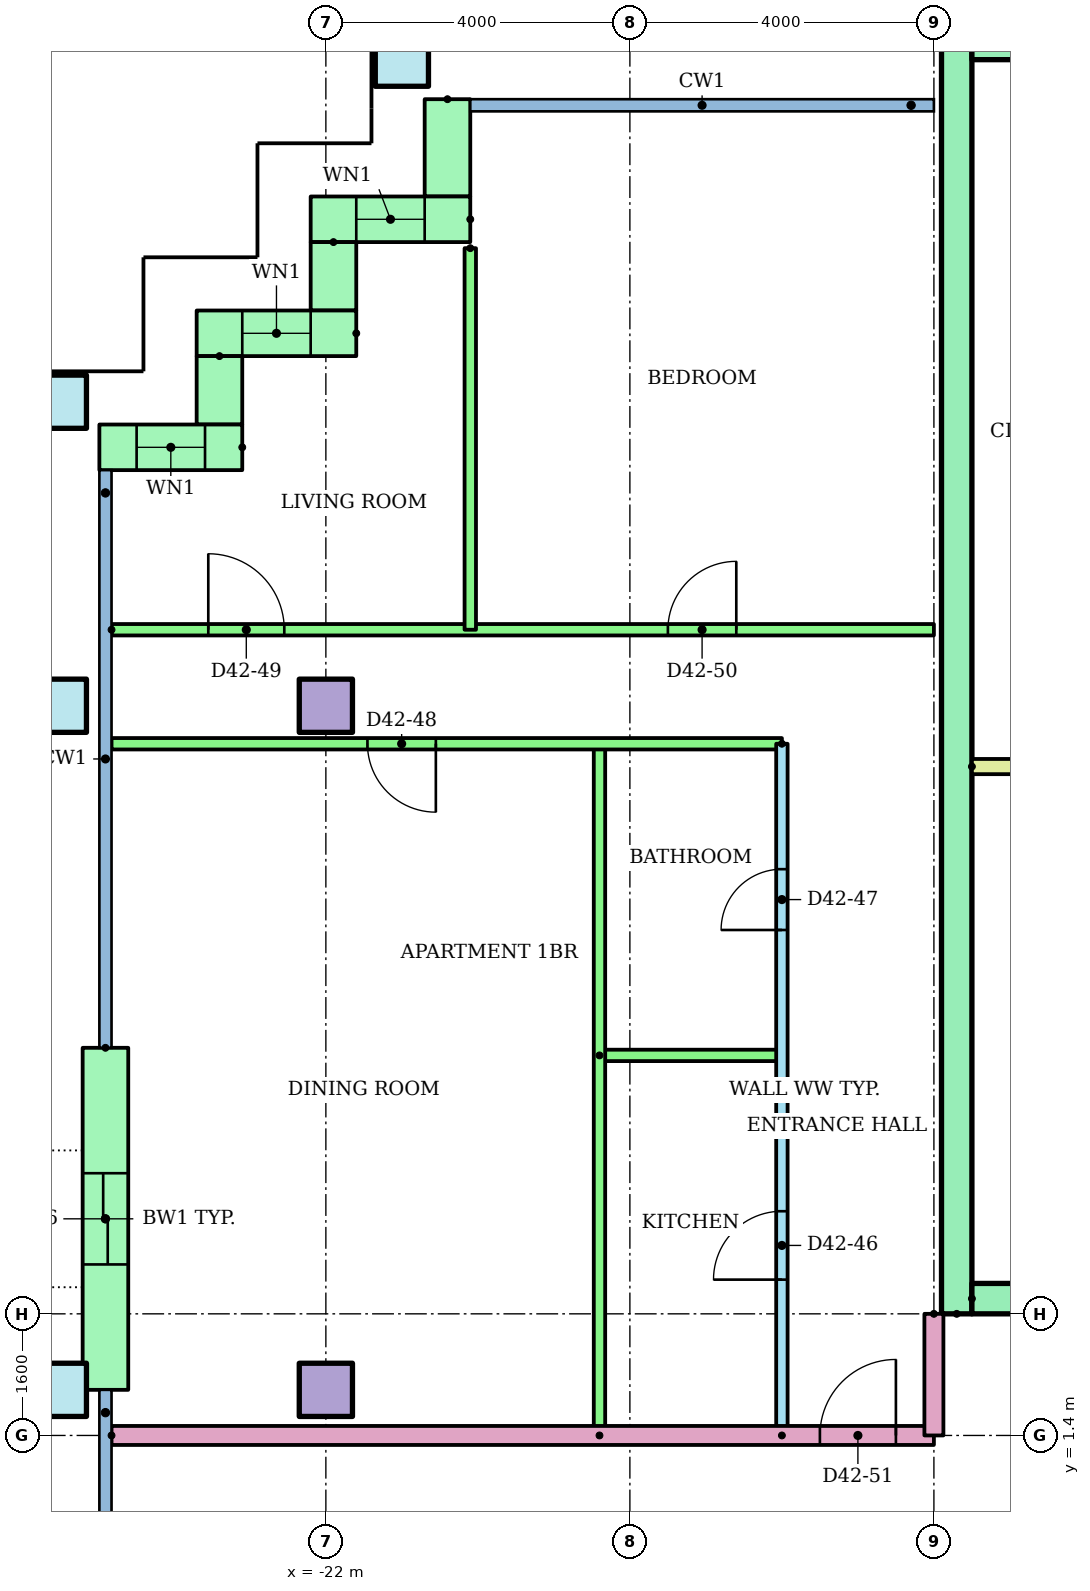
"""IFC4 building model, lengths in metres.
Left out: names, types, materials, properties, quantities, classifications, styles, units other than length and angle.
Written with IfcOpenShell. Run it as: python <this file> out.ifc"""

import sys

from ifc_helpers import new_model, si_unit, direction, frame, frame_2d, origin, origin_2d, place, context, subcontext, project, spatial, rectangle, hollow_rectangle, extrude, element, fill, save


model = new_model("IFC4")
c1 = context("Model", 3, precision=1e-05, world=origin(), true_north=direction((0.0, 1.0)))
c2 = subcontext(c1, "Body", "Model", "MODEL_VIEW")
j1 = project(units=[si_unit("LENGTHUNIT", "METRE"), si_unit("PLANEANGLEUNIT", "RADIAN")], contexts=[c1])
p1 = place(None, origin())
s1 = spatial("IfcSite", under=j1, at=p1, CompositionType="ELEMENT")
p2 = place(p1, origin())
s2 = spatial("IfcBuilding", under=s1, at=p2, CompositionType="ELEMENT")
p3 = place(p2, frame((0.0, 0.0, 165.3)))
s3 = spatial("IfcBuildingStorey", under=s2, at=p3, CompositionType="ELEMENT", Elevation=165.3)
p4 = place(p3, frame((-25.5, 2.0, 0.0)))
e1 = element("IfcColumn", 1, at=p4, inside=s3, PredefinedType="COLUMN", context=c2, shape_type="SweptSolid", body=[
    extrude(hollow_rectangle(XDim=0.7, YDim=0.7, WallThickness=0.036, at=origin_2d()), origin(), (0.0, 0.0, 1.0), 3.2),
])
p5 = place(p3, frame((-22.0, 2.0, 0.0)))
e2 = element("IfcColumn", 2, at=p5, inside=s3, PredefinedType="COLUMN", context=c2, shape_type="SweptSolid", body=[
    extrude(rectangle(XDim=0.7, YDim=0.7, at=origin_2d()), origin(), (0.0, 0.0, 1.0), 3.2),
])
p6 = place(p3, frame((-25.5, 11.0, 0.0)))
e3 = element("IfcColumn", 3, at=p6, inside=s3, PredefinedType="COLUMN", context=c2, shape_type="SweptSolid", body=[
    extrude(hollow_rectangle(XDim=0.7, YDim=0.7, WallThickness=0.036, at=origin_2d()), origin(), (0.0, 0.0, 1.0), 3.2),
])
p7 = place(p3, frame((-22.0, 11.0, 0.0)))
e4 = element("IfcColumn", 4, at=p7, inside=s3, PredefinedType="COLUMN", context=c2, shape_type="SweptSolid", body=[
    extrude(rectangle(XDim=0.7, YDim=0.7, at=origin_2d()), origin(), (0.0, 0.0, 1.0), 3.2),
])
for number, where in (
    (5, (-25.5, 15.0, 0.0)),
    (6, (-21.0, 19.5, 0.0)),
):
    element("IfcColumn", number, at=place(p3, frame(where)), inside=s3, PredefinedType="COLUMN", context=c2, shape_type="SweptSolid", body=[
        extrude(hollow_rectangle(XDim=0.7, YDim=0.7, WallThickness=0.036, at=origin_2d()), origin(), (0.0, 0.0, 1.0), 3.2),
    ])
p8 = place(p3, frame((-20.4, 18.98, 0.0), z_axis=(0.0, 0.0, 1.0), x_axis=(0.0, -1.0, 0.0)))
e7 = element("IfcWall", 7, at=p8, inside=s3, PredefinedType="STANDARD", context=c2, shape_type="SweptSolid", body=[
    extrude(rectangle(XDim=1.28, YDim=0.6, at=frame_2d((0.64, 0.0))), origin(), (0.0, 0.0, 1.0), 2.92),
])
p9 = place(p3, frame((-20.1, 17.4, 0.0), z_axis=(0.0, 0.0, 1.0), x_axis=(-1.0, 0.0, 0.0)))
e8 = element("IfcWall", 8, at=p9, inside=s3, PredefinedType="STANDARD", context=c2, shape_type="SweptSolid", body=[
    extrude(rectangle(XDim=2.1, YDim=0.6, at=frame_2d((1.05, 0.0))), origin(), (0.0, 0.0, 1.0), 2.92),
])
p10 = place(p9, frame((0.6, 0.0, 0.9)))
e9 = element("IfcOpeningElement", 9, at=p10, cuts=e8, PredefinedType="OPENING", context=c2, shape_type="SweptSolid", body=[
    extrude(rectangle(XDim=0.9, YDim=1.5, at=frame_2d((0.45, 0.75))), frame((0.0, 0.31, 0.0), z_axis=(0.0, -1.0, 0.0), x_axis=(1.0, 0.0, 0.0)), (0.0, 0.0, 1.0), 0.62),
])
p11 = place(p3, frame((-21.9, 17.1, 0.0), z_axis=(0.0, 0.0, 1.0), x_axis=(0.0, -1.0, 0.0)))
e10 = element("IfcWall", 10, at=p11, inside=s3, PredefinedType="STANDARD", context=c2, shape_type="SweptSolid", body=[
    extrude(rectangle(XDim=0.9, YDim=0.6, at=frame_2d((0.45, 0.0))), origin(), (0.0, 0.0, 1.0), 2.92),
])
p12 = place(p3, frame((-21.6, 15.9, 0.0), z_axis=(0.0, 0.0, 1.0), x_axis=(-1.0, 0.0, 0.0)))
e11 = element("IfcWall", 11, at=p12, inside=s3, PredefinedType="STANDARD", context=c2, shape_type="SweptSolid", body=[
    extrude(rectangle(XDim=2.1, YDim=0.6, at=frame_2d((1.05, 0.0))), origin(), (0.0, 0.0, 1.0), 2.92),
])
p13 = place(p12, frame((0.6, 0.0, 0.9)))
e12 = element("IfcOpeningElement", 12, at=p13, cuts=e11, PredefinedType="OPENING", context=c2, shape_type="SweptSolid", body=[
    extrude(rectangle(XDim=0.9, YDim=1.5, at=frame_2d((0.45, 0.75))), frame((0.0, 0.31, 0.0), z_axis=(0.0, -1.0, 0.0), x_axis=(1.0, 0.0, 0.0)), (0.0, 0.0, 1.0), 0.62),
])
p14 = place(p3, frame((-23.4, 15.6, 0.0), z_axis=(0.0, 0.0, 1.0), x_axis=(0.0, -1.0, 0.0)))
e13 = element("IfcWall", 13, at=p14, inside=s3, PredefinedType="STANDARD", context=c2, shape_type="SweptSolid", body=[
    extrude(rectangle(XDim=0.9, YDim=0.6, at=frame_2d((0.45, 0.0))), origin(), (0.0, 0.0, 1.0), 2.92),
])
p15 = place(p3, frame((-23.1, 14.4, 0.0), z_axis=(0.0, 0.0, 1.0), x_axis=(-1.0, 0.0, 0.0)))
e14 = element("IfcWall", 14, at=p15, inside=s3, PredefinedType="STANDARD", context=c2, shape_type="SweptSolid", body=[
    extrude(rectangle(XDim=1.88, YDim=0.6, at=frame_2d((0.94, 0.0))), origin(), (0.0, 0.0, 1.0), 2.92),
])
p16 = place(p15, frame((0.49, 0.0, 0.9)))
e15 = element("IfcOpeningElement", 15, at=p16, cuts=e14, PredefinedType="OPENING", context=c2, shape_type="SweptSolid", body=[
    extrude(rectangle(XDim=0.9, YDim=1.5, at=frame_2d((0.45, 0.75))), frame((0.0, 0.31, 0.0), z_axis=(0.0, -1.0, 0.0), x_axis=(1.0, 0.0, 0.0)), (0.0, 0.0, 1.0), 0.62),
])
p17 = place(p3, frame((-24.9, 6.5, 0.0), z_axis=(0.0, 0.0, 1.0), x_axis=(0.0, -1.0, 0.0)))
e16 = element("IfcWall", 16, at=p17, inside=s3, PredefinedType="STANDARD", context=c2, shape_type="SweptSolid", body=[
    extrude(rectangle(XDim=4.5, YDim=0.6, at=frame_2d((2.25, 0.0))), origin(), (0.0, 0.0, 1.0), 2.92),
])
p18 = place(p17, frame((1.65, 0.0, 0.0)))
e17 = element("IfcOpeningElement", 17, at=p18, cuts=e16, PredefinedType="OPENING", context=c2, shape_type="SweptSolid", body=[
    extrude(rectangle(XDim=1.2, YDim=2.1, at=frame_2d((0.6, 1.05))), frame((0.0, 0.31, 0.0), z_axis=(0.0, -1.0, 0.0), x_axis=(1.0, 0.0, 0.0)), (0.0, 0.0, 1.0), 0.62),
])
p19 = place(p3, frame((-13.7, 3.0, 0.0), z_axis=(0.0, 0.0, 1.0), x_axis=(0.0, 1.0, 0.0)))
e18 = element("IfcWall", 18, at=p19, inside=s3, PredefinedType="SHEAR", context=c2, shape_type="SweptSolid", body=[
    extrude(rectangle(XDim=17.0, YDim=0.4, at=frame_2d((8.5, 0.0))), origin(), (0.0, 0.0, 1.0), 2.92),
])
p20 = place(p3, frame((-13.5, 19.7, 0.0)))
e19 = element("IfcWall", 19, at=p20, inside=s3, PredefinedType="SHEAR", context=c2, shape_type="SweptSolid", body=[
    extrude(rectangle(XDim=27.0, YDim=0.4, at=frame_2d((13.5, 0.0))), origin(), (0.0, 0.0, 1.0), 2.92),
])
p21 = place(p3, frame((-13.5, 3.2, 0.0)))
e20 = element("IfcWall", 20, at=p21, inside=s3, PredefinedType="SHEAR", context=c2, shape_type="SweptSolid", body=[
    extrude(rectangle(XDim=27.0, YDim=0.4, at=frame_2d((13.5, 0.0))), origin(), (0.0, 0.0, 1.0), 2.92),
])
p22 = place(p21, frame((22.083, 0.0, 0.0)))
e21 = element("IfcOpeningElement", 21, at=p22, cuts=e20, PredefinedType="OPENING", context=c2, shape_type="SweptSolid", body=[
    extrude(rectangle(XDim=1.1, YDim=2.1, at=frame_2d((0.55, 1.05))), frame((0.0, 0.21, 0.0), z_axis=(0.0, -1.0, 0.0), x_axis=(1.0, 0.0, 0.0)), (0.0, 0.0, 1.0), 0.42),
])
p23 = place(p21, frame((25.128, 0.0, 0.0)))
e22 = element("IfcOpeningElement", 22, at=p23, cuts=e20, PredefinedType="OPENING", context=c2, shape_type="SweptSolid", body=[
    extrude(rectangle(XDim=1.1, YDim=2.1, at=frame_2d((0.55, 1.05))), frame((0.0, 0.21, 0.0), z_axis=(0.0, -1.0, 0.0), x_axis=(1.0, 0.0, 0.0)), (0.0, 0.0, 1.0), 0.42),
])
p24 = place(p21, frame((12.6, 0.0, 0.0)))
e23 = element("IfcOpeningElement", 23, at=p24, cuts=e20, PredefinedType="OPENING", context=c2, shape_type="SweptSolid", body=[
    extrude(rectangle(XDim=1.8, YDim=2.1, at=frame_2d((0.9, 1.05))), frame((0.0, 0.21, 0.0), z_axis=(0.0, -1.0, 0.0), x_axis=(1.0, 0.0, 0.0)), (0.0, 0.0, 1.0), 0.42),
])
p25 = place(p3, frame((-13.5, 10.2, 0.0)))
e24 = element("IfcWall", 24, at=p25, inside=s3, PredefinedType="PARTITIONING", context=c2, shape_type="SweptSolid", body=[
    extrude(rectangle(XDim=3.9, YDim=0.2, at=frame_2d((1.95, 0.0))), origin(), (0.0, 0.0, 1.0), 2.92),
])
p26 = place(p3, frame((-16.0, 1.4, 0.0), z_axis=(0.0, 0.0, 1.0), x_axis=(0.0, 1.0, 0.0)))
e25 = element("IfcWall", 25, at=p26, inside=s3, PredefinedType="PARTITIONING", context=c2, shape_type="SweptSolid", body=[
    extrude(rectangle(XDim=9.1, YDim=0.15, at=frame_2d((4.55, 0.0))), origin(), (0.0, 0.0, 1.0), 2.4),
])
p27 = place(p26, frame((2.05, 0.0, 0.0)))
e26 = element("IfcOpeningElement", 26, at=p27, cuts=e25, PredefinedType="OPENING", context=c2, shape_type="SweptSolid", body=[
    extrude(rectangle(XDim=0.9, YDim=2.1, at=frame_2d((0.45, 1.05))), frame((0.0, 0.085, 0.0), z_axis=(0.0, -1.0, 0.0), x_axis=(1.0, 0.0, 0.0)), (0.0, 0.0, 1.0), 0.17),
])
p28 = place(p26, frame((6.65, 0.0, 0.0)))
e27 = element("IfcOpeningElement", 27, at=p28, cuts=e25, PredefinedType="OPENING", context=c2, shape_type="SweptSolid", body=[
    extrude(rectangle(XDim=0.8, YDim=2.1, at=frame_2d((0.4, 1.05))), frame((0.0, 0.085, 0.0), z_axis=(0.0, -1.0, 0.0), x_axis=(1.0, 0.0, 0.0)), (0.0, 0.0, 1.0), 0.17),
])
p29 = place(p3, frame((-18.4, 6.4, 0.0)))
e28 = element("IfcWall", 28, at=p29, inside=s3, PredefinedType="PARTITIONING", context=c2, shape_type="SweptSolid", body=[
    extrude(rectangle(XDim=2.4, YDim=0.15, at=frame_2d((1.2, 0.0))), origin(), (0.0, 0.0, 1.0), 2.4),
])
p30 = place(p3, frame((-18.4, 1.4, 0.0), z_axis=(0.0, 0.0, 1.0), x_axis=(0.0, 1.0, 0.0)))
e29 = element("IfcWall", 29, at=p30, inside=s3, PredefinedType="PARTITIONING", context=c2, shape_type="SweptSolid", body=[
    extrude(rectangle(XDim=9.1, YDim=0.15, at=frame_2d((4.55, 0.0))), origin(), (0.0, 0.0, 1.0), 2.4),
])
p31 = place(p3, frame((-16.0, 10.5, 0.0), z_axis=(0.0, 0.0, 1.0), x_axis=(-1.0, 0.0, 0.0)))
e30 = element("IfcWall", 30, at=p31, inside=s3, PredefinedType="PARTITIONING", context=c2, shape_type="SweptSolid", body=[
    extrude(rectangle(XDim=8.82, YDim=0.15, at=frame_2d((4.41, 0.0))), origin(), (0.0, 0.0, 1.0), 2.4),
])
p32 = place(p31, frame((4.553, 0.0, 0.0)))
e31 = element("IfcOpeningElement", 31, at=p32, cuts=e30, PredefinedType="OPENING", context=c2, shape_type="SweptSolid", body=[
    extrude(rectangle(XDim=0.9, YDim=2.1, at=frame_2d((0.45, 1.05))), frame((0.0, 0.085, 0.0), z_axis=(0.0, -1.0, 0.0), x_axis=(1.0, 0.0, 0.0)), (0.0, 0.0, 1.0), 0.17),
])
p33 = place(p3, frame((-24.82, 12.0, 0.0)))
e32 = element("IfcWall", 32, at=p33, inside=s3, PredefinedType="PARTITIONING", context=c2, shape_type="SweptSolid", body=[
    extrude(rectangle(XDim=10.82, YDim=0.15, at=frame_2d((5.41, 0.0))), origin(), (0.0, 0.0, 1.0), 2.4),
])
p34 = place(p33, frame((1.273, 0.0, 0.0)))
e33 = element("IfcOpeningElement", 33, at=p34, cuts=e32, PredefinedType="OPENING", context=c2, shape_type="SweptSolid", body=[
    extrude(rectangle(XDim=1.0, YDim=2.1, at=frame_2d((0.5, 1.05))), frame((0.0, 0.085, 0.0), z_axis=(0.0, -1.0, 0.0), x_axis=(1.0, 0.0, 0.0)), (0.0, 0.0, 1.0), 0.17),
])
p35 = place(p33, frame((7.32, 0.0, 0.0)))
e34 = element("IfcOpeningElement", 34, at=p35, cuts=e32, PredefinedType="OPENING", context=c2, shape_type="SweptSolid", body=[
    extrude(rectangle(XDim=0.9, YDim=2.1, at=frame_2d((0.45, 1.05))), frame((0.0, 0.085, 0.0), z_axis=(0.0, -1.0, 0.0), x_axis=(1.0, 0.0, 0.0)), (0.0, 0.0, 1.0), 0.17),
])
p36 = place(p3, frame((-20.1, 17.02, 0.0), z_axis=(0.0, 0.0, 1.0), x_axis=(0.0, -1.0, 0.0)))
e35 = element("IfcWall", 35, at=p36, inside=s3, PredefinedType="PARTITIONING", context=c2, shape_type="SweptSolid", body=[
    extrude(rectangle(XDim=5.02, YDim=0.15, at=frame_2d((2.51, 0.0))), origin(), (0.0, 0.0, 1.0), 2.4),
])
p37 = place(p3, frame((-24.82, 1.4, 0.0)))
e36 = element("IfcWall", 36, at=p37, inside=s3, PredefinedType="PARTITIONING", context=c2, shape_type="SweptSolid", body=[
    extrude(rectangle(XDim=10.82, YDim=0.25, at=frame_2d((5.41, 0.0))), origin(), (0.0, 0.0, 1.0), 2.4),
])
p38 = place(p37, frame((9.32, 0.0, 0.0)))
e37 = element("IfcOpeningElement", 37, at=p38, cuts=e36, PredefinedType="OPENING", context=c2, shape_type="SweptSolid", body=[
    extrude(rectangle(XDim=1.0, YDim=2.1, at=frame_2d((0.5, 1.05))), frame((0.0, 0.135, 0.0), z_axis=(0.0, -1.0, 0.0), x_axis=(1.0, 0.0, 0.0)), (0.0, 0.0, 1.0), 0.27),
])
p39 = place(p3, frame((-14.0, 3.0, 0.0), z_axis=(0.0, 0.0, 1.0), x_axis=(0.0, -1.0, 0.0)))
e38 = element("IfcWall", 38, at=p39, inside=s3, PredefinedType="PARTITIONING", context=c2, shape_type="SweptSolid", body=[
    extrude(rectangle(XDim=1.6, YDim=0.25, at=frame_2d((0.8, 0.0))), origin(), (0.0, 0.0, 1.0), 2.4),
])
p40 = place(p10, origin())
e39 = element("IfcWindow", 39, at=p40, inside=s3, PartitioningType="SINGLE_PANEL", PredefinedType="WINDOW", context=c2, shape_type="SweptSolid", body=[
    extrude(rectangle(XDim=0.9, YDim=1.5, at=frame_2d((0.45, 0.75))), frame((0.0, 0.03, 0.0), z_axis=(0.0, -1.0, 0.0), x_axis=(1.0, 0.0, 0.0)), (0.0, 0.0, 1.0), 0.06),
])
fill(e9, e39)
p41 = place(p13, origin())
e40 = element("IfcWindow", 40, at=p41, inside=s3, PartitioningType="SINGLE_PANEL", PredefinedType="WINDOW", context=c2, shape_type="SweptSolid", body=[
    extrude(rectangle(XDim=0.9, YDim=1.5, at=frame_2d((0.45, 0.75))), frame((0.0, 0.03, 0.0), z_axis=(0.0, -1.0, 0.0), x_axis=(1.0, 0.0, 0.0)), (0.0, 0.0, 1.0), 0.06),
])
fill(e12, e40)
p42 = place(p16, origin())
e41 = element("IfcWindow", 41, at=p42, inside=s3, PartitioningType="SINGLE_PANEL", PredefinedType="WINDOW", context=c2, shape_type="SweptSolid", body=[
    extrude(rectangle(XDim=0.9, YDim=1.5, at=frame_2d((0.45, 0.75))), frame((0.0, 0.03, 0.0), z_axis=(0.0, -1.0, 0.0), x_axis=(1.0, 0.0, 0.0)), (0.0, 0.0, 1.0), 0.06),
])
fill(e15, e41)
p43 = place(p27, origin())
e42 = element("IfcDoor", 42, at=p43, inside=s3, OperationType="SINGLE_SWING_LEFT", PredefinedType="DOOR", context=c2, shape_type="SweptSolid", body=[
    extrude(rectangle(XDim=0.9, YDim=2.1, at=frame_2d((0.45, 1.05))), frame((0.0, 0.025, 0.0), z_axis=(0.0, -1.0, 0.0), x_axis=(1.0, 0.0, 0.0)), (0.0, 0.0, 1.0), 0.05),
])
fill(e26, e42)
p44 = place(p28, origin())
e43 = element("IfcDoor", 43, at=p44, inside=s3, OperationType="SINGLE_SWING_LEFT", PredefinedType="DOOR", context=c2, shape_type="SweptSolid", body=[
    extrude(rectangle(XDim=0.8, YDim=2.1, at=frame_2d((0.4, 1.05))), frame((0.0, 0.025, 0.0), z_axis=(0.0, -1.0, 0.0), x_axis=(1.0, 0.0, 0.0)), (0.0, 0.0, 1.0), 0.05),
])
fill(e27, e43)
p45 = place(p32, origin())
e44 = element("IfcDoor", 44, at=p45, inside=s3, OperationType="SINGLE_SWING_LEFT", PredefinedType="DOOR", context=c2, shape_type="SweptSolid", body=[
    extrude(rectangle(XDim=0.9, YDim=2.1, at=frame_2d((0.45, 1.05))), frame((0.0, 0.025, 0.0), z_axis=(0.0, -1.0, 0.0), x_axis=(1.0, 0.0, 0.0)), (0.0, 0.0, 1.0), 0.05),
])
fill(e31, e44)
p46 = place(p34, origin())
e45 = element("IfcDoor", 45, at=p46, inside=s3, OperationType="SINGLE_SWING_LEFT", PredefinedType="DOOR", context=c2, shape_type="SweptSolid", body=[
    extrude(rectangle(XDim=1.0, YDim=2.1, at=frame_2d((0.5, 1.05))), frame((0.0, 0.025, 0.0), z_axis=(0.0, -1.0, 0.0), x_axis=(1.0, 0.0, 0.0)), (0.0, 0.0, 1.0), 0.05),
])
fill(e33, e45)
p47 = place(p35, origin())
e46 = element("IfcDoor", 46, at=p47, inside=s3, OperationType="SINGLE_SWING_RIGHT", PredefinedType="DOOR", context=c2, shape_type="SweptSolid", body=[
    extrude(rectangle(XDim=0.9, YDim=2.1, at=frame_2d((0.45, 1.05))), frame((0.0, 0.025, 0.0), z_axis=(0.0, -1.0, 0.0), x_axis=(1.0, 0.0, 0.0)), (0.0, 0.0, 1.0), 0.05),
])
fill(e34, e46)
p48 = place(p38, origin())
e47 = element("IfcDoor", 47, at=p48, inside=s3, OperationType="SINGLE_SWING_RIGHT", PredefinedType="DOOR", context=c2, shape_type="SweptSolid", body=[
    extrude(rectangle(XDim=1.0, YDim=2.1, at=frame_2d((0.5, 1.05))), frame((0.0, 0.025, 0.0), z_axis=(0.0, -1.0, 0.0), x_axis=(1.0, 0.0, 0.0)), (0.0, 0.0, 1.0), 0.05),
])
fill(e37, e47)
p49 = place(p18, origin())
e48 = element("IfcDoor", 48, at=p49, inside=s3, OperationType="SLIDING_TO_LEFT", PredefinedType="DOOR", context=c2, shape_type="SweptSolid", body=[
    extrude(rectangle(XDim=1.2, YDim=2.1, at=frame_2d((0.6, 1.05))), frame((0.0, 0.025, 0.0), z_axis=(0.0, -1.0, 0.0), x_axis=(1.0, 0.0, 0.0)), (0.0, 0.0, 1.0), 0.05),
])
fill(e17, e48)
save(model, sys.argv[1])
